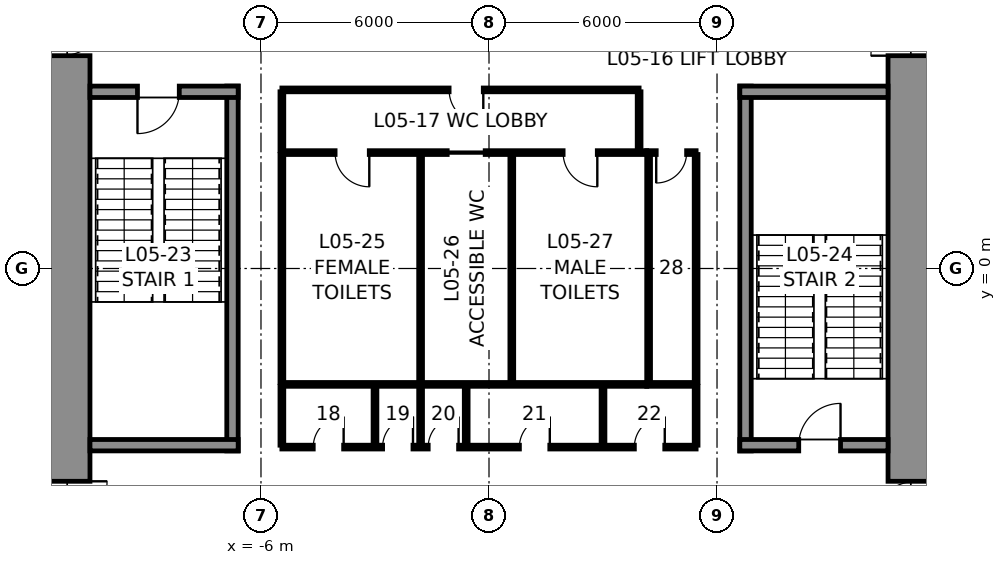
"""IFC4 building model, lengths in metres.
Left out: names, types, materials, properties, quantities, classifications, styles, units other than length and angle.
Written with IfcOpenShell. Run it as: python <this file> out.ifc"""

import sys

from ifc_helpers import new_model, si_unit, direction, frame, frame_2d, origin, place, context, subcontext, project, spatial, rectangle, extrude, element, fill, save


model = new_model("IFC4")
c1 = context("Model", 3, precision=1e-05, world=origin(), true_north=direction((0.0, 1.0)))
c2 = subcontext(c1, "Body", "Model", "MODEL_VIEW")
j1 = project(units=[si_unit("LENGTHUNIT", "METRE"), si_unit("PLANEANGLEUNIT", "RADIAN")], contexts=[c1])
p1 = place(None, origin())
s1 = spatial("IfcSite", under=j1, at=p1, CompositionType="ELEMENT")
p2 = place(p1, origin())
s2 = spatial("IfcBuilding", under=s1, at=p2, CompositionType="ELEMENT")
p3 = place(p2, frame((0.0, 0.0, 26.5)))
s3 = spatial("IfcBuildingStorey", under=s2, at=p3, CompositionType="ELEMENT", Elevation=26.5)
p4 = place(p3, frame((11.25, 10.5, 0.0), z_axis=(0.0, 0.0, 1.0), x_axis=(0.0, -1.0, 0.0)))
e1 = element("IfcWall", 1, at=p4, inside=s3, PredefinedType="SHEAR", context=c2, shape_type="SweptSolid", body=[
    extrude(rectangle(XDim=21.0, YDim=1.5, at=frame_2d((10.5, 0.0))), origin(), (0.0, 0.0, 1.0), 5.5),
])
p5 = place(p4, frame((3.7, 0.0, 0.0)))
e2 = element("IfcOpeningElement", 2, at=p5, cuts=e1, PredefinedType="OPENING", context=c2, shape_type="SweptSolid", body=[
    extrude(rectangle(XDim=1.2, YDim=2.3, at=frame_2d((0.6, 1.15))), frame((0.0, 0.76, 0.0), z_axis=(0.0, -1.0, 0.0), x_axis=(1.0, 0.0, 0.0)), (0.0, 0.0, 1.0), 1.52),
])
p6 = place(p4, frame((16.1, 0.0, 0.0)))
e3 = element("IfcOpeningElement", 3, at=p6, cuts=e1, PredefinedType="OPENING", context=c2, shape_type="SweptSolid", body=[
    extrude(rectangle(XDim=1.2, YDim=2.3, at=frame_2d((0.6, 1.15))), frame((0.0, 0.76, 0.0), z_axis=(0.0, -1.0, 0.0), x_axis=(1.0, 0.0, 0.0)), (0.0, 0.0, 1.0), 1.52),
])
p7 = place(p3, frame((-11.25, -10.5, 0.0), z_axis=(0.0, 0.0, 1.0), x_axis=(0.0, 1.0, 0.0)))
e4 = element("IfcWall", 4, at=p7, inside=s3, PredefinedType="SHEAR", context=c2, shape_type="SweptSolid", body=[
    extrude(rectangle(XDim=21.0, YDim=1.5, at=frame_2d((10.5, 0.0))), origin(), (0.0, 0.0, 1.0), 5.5),
])
p8 = place(p7, frame((16.1, 0.0, 0.0)))
e5 = element("IfcOpeningElement", 5, at=p8, cuts=e4, PredefinedType="OPENING", context=c2, shape_type="SweptSolid", body=[
    extrude(rectangle(XDim=1.2, YDim=2.3, at=frame_2d((0.6, 1.15))), frame((0.0, 0.76, 0.0), z_axis=(0.0, -1.0, 0.0), x_axis=(1.0, 0.0, 0.0)), (0.0, 0.0, 1.0), 1.52),
])
p9 = place(p7, frame((3.7, 0.0, 0.0)))
e6 = element("IfcOpeningElement", 6, at=p9, cuts=e4, PredefinedType="OPENING", context=c2, shape_type="SweptSolid", body=[
    extrude(rectangle(XDim=1.2, YDim=2.3, at=frame_2d((0.6, 1.15))), frame((0.0, 0.76, 0.0), z_axis=(0.0, -1.0, 0.0), x_axis=(1.0, 0.0, 0.0)), (0.0, 0.0, 1.0), 1.52),
])
p10 = place(p3, frame((-6.75, -4.8, 0.0), z_axis=(0.0, 0.0, 1.0), x_axis=(0.0, 1.0, 0.0)))
e7 = element("IfcWall", 7, at=p10, inside=s3, PredefinedType="SOLIDWALL", context=c2, shape_type="SweptSolid", body=[
    extrude(rectangle(XDim=9.6, YDim=0.3, at=frame_2d((4.8, 0.0))), origin(), (0.0, 0.0, 1.0), 5.25),
])
p11 = place(p3, frame((-10.5, 4.65, 0.0), z_axis=(0.0, 0.0, 1.0), x_axis=(1.0, 0.0, 0.0)))
e8 = element("IfcWall", 8, at=p11, inside=s3, PredefinedType="SOLIDWALL", context=c2, shape_type="SweptSolid", body=[
    extrude(rectangle(XDim=3.9, YDim=0.3, at=frame_2d((1.95, 0.0))), origin(), (0.0, 0.0, 1.0), 5.25),
])
p12 = place(p11, frame((1.25, 0.0, 0.0)))
e9 = element("IfcOpeningElement", 9, at=p12, cuts=e8, PredefinedType="OPENING", context=c2, shape_type="SweptSolid", body=[
    extrude(rectangle(XDim=1.1, YDim=2.3, at=frame_2d((0.55, 1.15))), frame((0.0, 0.16, 0.0), z_axis=(0.0, -1.0, 0.0), x_axis=(1.0, 0.0, 0.0)), (0.0, 0.0, 1.0), 0.32),
])
p13 = place(p3, frame((-6.6, -4.65, 0.0), z_axis=(0.0, 0.0, 1.0), x_axis=(-1.0, 0.0, 0.0)))
e10 = element("IfcWall", 10, at=p13, inside=s3, PredefinedType="SOLIDWALL", context=c2, shape_type="SweptSolid", body=[
    extrude(rectangle(XDim=3.9, YDim=0.3, at=frame_2d((1.95, 0.0))), origin(), (0.0, 0.0, 1.0), 5.25),
])
p14 = place(p3, frame((6.75, -4.8, 0.0), z_axis=(0.0, 0.0, 1.0), x_axis=(0.0, 1.0, 0.0)))
e11 = element("IfcWall", 11, at=p14, inside=s3, PredefinedType="SOLIDWALL", context=c2, shape_type="SweptSolid", body=[
    extrude(rectangle(XDim=9.6, YDim=0.3, at=frame_2d((4.8, 0.0))), origin(), (0.0, 0.0, 1.0), 5.25),
])
p15 = place(p3, frame((6.6, 4.65, 0.0), z_axis=(0.0, 0.0, 1.0), x_axis=(1.0, 0.0, 0.0)))
e12 = element("IfcWall", 12, at=p15, inside=s3, PredefinedType="SOLIDWALL", context=c2, shape_type="SweptSolid", body=[
    extrude(rectangle(XDim=3.9, YDim=0.3, at=frame_2d((1.95, 0.0))), origin(), (0.0, 0.0, 1.0), 5.25),
])
p16 = place(p3, frame((10.5, -4.65, 0.0), z_axis=(0.0, 0.0, 1.0), x_axis=(-1.0, 0.0, 0.0)))
e13 = element("IfcWall", 13, at=p16, inside=s3, PredefinedType="SOLIDWALL", context=c2, shape_type="SweptSolid", body=[
    extrude(rectangle(XDim=3.9, YDim=0.3, at=frame_2d((1.95, 0.0))), origin(), (0.0, 0.0, 1.0), 5.25),
])
p17 = place(p16, frame((1.25, 0.0, 0.0)))
e14 = element("IfcOpeningElement", 14, at=p17, cuts=e13, PredefinedType="OPENING", context=c2, shape_type="SweptSolid", body=[
    extrude(rectangle(XDim=1.1, YDim=2.3, at=frame_2d((0.55, 1.15))), frame((0.0, 0.16, 0.0), z_axis=(0.0, -1.0, 0.0), x_axis=(1.0, 0.0, 0.0)), (0.0, 0.0, 1.0), 0.32),
])
p18 = place(p3, frame((-5.45, 3.05, 0.0), z_axis=(0.0, 0.0, 1.0), x_axis=(1.0, 0.0, 0.0)))
e15 = element("IfcWall", 15, at=p18, inside=s3, PredefinedType="PARTITIONING", context=c2, shape_type="SweptSolid", body=[
    extrude(rectangle(XDim=9.6, YDim=0.1, at=frame_2d((4.8, 0.0))), origin(), (0.0, 0.0, 1.0), 5.25),
])
p19 = place(p18, frame((1.4, 0.0, 0.0)))
e16 = element("IfcOpeningElement", 16, at=p19, cuts=e15, PredefinedType="OPENING", context=c2, shape_type="SweptSolid", body=[
    extrude(rectangle(XDim=0.9, YDim=2.3, at=frame_2d((0.45, 1.15))), frame((0.0, 0.06, 0.0), z_axis=(0.0, -1.0, 0.0), x_axis=(1.0, 0.0, 0.0)), (0.0, 0.0, 1.0), 0.12),
])
p20 = place(p18, frame((4.35, 0.0, 0.0)))
e17 = element("IfcOpeningElement", 17, at=p20, cuts=e15, PredefinedType="OPENING", context=c2, shape_type="SweptSolid", body=[
    extrude(rectangle(XDim=1.0, YDim=2.3, at=frame_2d((0.5, 1.15))), frame((0.0, 0.06, 0.0), z_axis=(0.0, -1.0, 0.0), x_axis=(1.0, 0.0, 0.0)), (0.0, 0.0, 1.0), 0.12),
])
p21 = place(p18, frame((7.4, 0.0, 0.0)))
e18 = element("IfcOpeningElement", 18, at=p21, cuts=e15, PredefinedType="OPENING", context=c2, shape_type="SweptSolid", body=[
    extrude(rectangle(XDim=0.9, YDim=2.3, at=frame_2d((0.45, 1.15))), frame((0.0, 0.06, 0.0), z_axis=(0.0, -1.0, 0.0), x_axis=(1.0, 0.0, 0.0)), (0.0, 0.0, 1.0), 0.12),
])
p22 = place(p3, frame((4.15, 3.05, 0.0), z_axis=(0.0, 0.0, 1.0), x_axis=(1.0, 0.0, 0.0)))
e19 = element("IfcWall", 19, at=p22, inside=s3, PredefinedType="PARTITIONING", context=c2, shape_type="SweptSolid", body=[
    extrude(rectangle(XDim=1.3, YDim=0.1, at=frame_2d((0.65, 0.0))), origin(), (0.0, 0.0, 1.0), 5.25),
])
p23 = place(p22, frame((0.25, 0.0, 0.0)))
e20 = element("IfcOpeningElement", 20, at=p23, cuts=e19, PredefinedType="OPENING", context=c2, shape_type="SweptSolid", body=[
    extrude(rectangle(XDim=0.8, YDim=2.3, at=frame_2d((0.4, 1.15))), frame((0.0, 0.06, 0.0), z_axis=(0.0, -1.0, 0.0), x_axis=(1.0, 0.0, 0.0)), (0.0, 0.0, 1.0), 0.12),
])
p24 = place(p3, frame((4.15, -3.05, 0.0), z_axis=(0.0, 0.0, 1.0), x_axis=(-1.0, 0.0, 0.0)))
e21 = element("IfcWall", 21, at=p24, inside=s3, PredefinedType="PARTITIONING", context=c2, shape_type="SweptSolid", body=[
    extrude(rectangle(XDim=9.6, YDim=0.1, at=frame_2d((4.8, 0.0))), origin(), (0.0, 0.0, 1.0), 5.25),
])
p25 = place(p3, frame((5.45, -3.05, 0.0), z_axis=(0.0, 0.0, 1.0), x_axis=(-1.0, 0.0, 0.0)))
e22 = element("IfcWall", 22, at=p25, inside=s3, PredefinedType="PARTITIONING", context=c2, shape_type="SweptSolid", body=[
    extrude(rectangle(XDim=1.3, YDim=0.1, at=frame_2d((0.65, 0.0))), origin(), (0.0, 0.0, 1.0), 5.25),
])
for number, where, z_axis, x_axis in (
    (23, (5.45, 3.0, 0.0), (0.0, 0.0, 1.0), (0.0, -1.0, 0.0)),
    (24, (-5.45, -3.0, 0.0), (0.0, 0.0, 1.0), (0.0, 1.0, 0.0)),
    (25, (-1.8, -3.0, 0.0), (0.0, 0.0, 1.0), (0.0, 1.0, 0.0)),
    (26, (0.6, -3.0, 0.0), (0.0, 0.0, 1.0), (0.0, 1.0, 0.0)),
    (27, (4.2, -3.0, 0.0), (0.0, 0.0, 1.0), (0.0, 1.0, 0.0)),
):
    element("IfcWall", number, at=place(p3, frame(where, z_axis=z_axis, x_axis=x_axis)), inside=s3, PredefinedType="PARTITIONING", context=c2, shape_type="SweptSolid", body=[
        extrude(rectangle(XDim=6.0, YDim=0.1, at=frame_2d((3.0, 0.0))), origin(), (0.0, 0.0, 1.0), 5.25),
    ])
p26 = place(p3, frame((-5.45, 4.7, 0.0), z_axis=(0.0, 0.0, 1.0), x_axis=(1.0, 0.0, 0.0)))
e28 = element("IfcWall", 28, at=p26, inside=s3, PredefinedType="PARTITIONING", context=c2, shape_type="SweptSolid", body=[
    extrude(rectangle(XDim=9.4, YDim=0.1, at=frame_2d((4.7, 0.0))), origin(), (0.0, 0.0, 1.0), 5.25),
])
p27 = place(p26, frame((4.4, 0.0, 0.0)))
e29 = element("IfcOpeningElement", 29, at=p27, cuts=e28, PredefinedType="OPENING", context=c2, shape_type="SweptSolid", body=[
    extrude(rectangle(XDim=0.9, YDim=2.3, at=frame_2d((0.45, 1.15))), frame((0.0, 0.06, 0.0), z_axis=(0.0, -1.0, 0.0), x_axis=(1.0, 0.0, 0.0)), (0.0, 0.0, 1.0), 0.12),
])
for number, where, z_axis, x_axis in (
    (30, (-5.45, 3.1, 0.0), (0.0, 0.0, 1.0), (0.0, 1.0, 0.0)),
    (31, (3.95, 3.1, 0.0), (0.0, 0.0, 1.0), (0.0, 1.0, 0.0)),
):
    element("IfcWall", number, at=place(p3, frame(where, z_axis=z_axis, x_axis=x_axis)), inside=s3, PredefinedType="PARTITIONING", context=c2, shape_type="SweptSolid", body=[
        extrude(rectangle(XDim=1.55, YDim=0.1, at=frame_2d((0.775, 0.0))), origin(), (0.0, 0.0, 1.0), 5.25),
    ])
p28 = place(p3, frame((5.45, -4.7, 0.0), z_axis=(0.0, 0.0, 1.0), x_axis=(-1.0, 0.0, 0.0)))
e32 = element("IfcWall", 32, at=p28, inside=s3, PredefinedType="PARTITIONING", context=c2, shape_type="SweptSolid", body=[
    extrude(rectangle(XDim=10.9, YDim=0.1, at=frame_2d((5.45, 0.0))), origin(), (0.0, 0.0, 1.0), 5.25),
])
p29 = place(p28, frame((9.275, 0.0, 0.0)))
e33 = element("IfcOpeningElement", 33, at=p29, cuts=e32, PredefinedType="OPENING", context=c2, shape_type="SweptSolid", body=[
    extrude(rectangle(XDim=0.8, YDim=2.3, at=frame_2d((0.4, 1.15))), frame((0.0, 0.06, 0.0), z_axis=(0.0, -1.0, 0.0), x_axis=(1.0, 0.0, 0.0)), (0.0, 0.0, 1.0), 0.12),
])
p30 = place(p28, frame((7.45, 0.0, 0.0)))
e34 = element("IfcOpeningElement", 34, at=p30, cuts=e32, PredefinedType="OPENING", context=c2, shape_type="SweptSolid", body=[
    extrude(rectangle(XDim=0.8, YDim=2.3, at=frame_2d((0.4, 1.15))), frame((0.0, 0.06, 0.0), z_axis=(0.0, -1.0, 0.0), x_axis=(1.0, 0.0, 0.0)), (0.0, 0.0, 1.0), 0.12),
])
p31 = place(p28, frame((6.25, 0.0, 0.0)))
e35 = element("IfcOpeningElement", 35, at=p31, cuts=e32, PredefinedType="OPENING", context=c2, shape_type="SweptSolid", body=[
    extrude(rectangle(XDim=0.8, YDim=2.3, at=frame_2d((0.4, 1.15))), frame((0.0, 0.06, 0.0), z_axis=(0.0, -1.0, 0.0), x_axis=(1.0, 0.0, 0.0)), (0.0, 0.0, 1.0), 0.12),
])
p32 = place(p28, frame((3.85, 0.0, 0.0)))
e36 = element("IfcOpeningElement", 36, at=p32, cuts=e32, PredefinedType="OPENING", context=c2, shape_type="SweptSolid", body=[
    extrude(rectangle(XDim=0.8, YDim=2.3, at=frame_2d((0.4, 1.15))), frame((0.0, 0.06, 0.0), z_axis=(0.0, -1.0, 0.0), x_axis=(1.0, 0.0, 0.0)), (0.0, 0.0, 1.0), 0.12),
])
p33 = place(p28, frame((0.825, 0.0, 0.0)))
e37 = element("IfcOpeningElement", 37, at=p33, cuts=e32, PredefinedType="OPENING", context=c2, shape_type="SweptSolid", body=[
    extrude(rectangle(XDim=0.8, YDim=2.3, at=frame_2d((0.4, 1.15))), frame((0.0, 0.06, 0.0), z_axis=(0.0, -1.0, 0.0), x_axis=(1.0, 0.0, 0.0)), (0.0, 0.0, 1.0), 0.12),
])
for number, where, z_axis, x_axis in (
    (38, (-5.45, -3.1, 0.0), (0.0, 0.0, 1.0), (0.0, -1.0, 0.0)),
    (39, (5.45, -3.1, 0.0), (0.0, 0.0, 1.0), (0.0, -1.0, 0.0)),
    (40, (-3.0, -3.1, 0.0), (0.0, 0.0, 1.0), (0.0, -1.0, 0.0)),
    (41, (-1.8, -3.1, 0.0), (0.0, 0.0, 1.0), (0.0, -1.0, 0.0)),
    (42, (-0.6, -3.1, 0.0), (0.0, 0.0, 1.0), (0.0, -1.0, 0.0)),
    (43, (3.0, -3.1, 0.0), (0.0, 0.0, 1.0), (0.0, -1.0, 0.0)),
):
    element("IfcWall", number, at=place(p3, frame(where, z_axis=z_axis, x_axis=x_axis)), inside=s3, PredefinedType="PARTITIONING", context=c2, shape_type="SweptSolid", body=[
        extrude(rectangle(XDim=1.55, YDim=0.1, at=frame_2d((0.775, 0.0))), origin(), (0.0, 0.0, 1.0), 5.25),
    ])
p34 = place(p12, frame((1.1, 0.0, 0.0), z_axis=(0.0, 0.0, 1.0), x_axis=(-1.0, 0.0, 0.0)))
e44 = element("IfcDoor", 44, at=p34, inside=s3, OperationType="SINGLE_SWING_RIGHT", PredefinedType="DOOR", context=c2, shape_type="SweptSolid", body=[
    extrude(rectangle(XDim=1.1, YDim=2.3, at=frame_2d((0.55, 1.15))), frame((0.0, 0.025, 0.0), z_axis=(0.0, -1.0, 0.0), x_axis=(1.0, 0.0, 0.0)), (0.0, 0.0, 1.0), 0.05),
])
fill(e9, e44)
p35 = place(p17, frame((1.1, 0.0, 0.0), z_axis=(0.0, 0.0, 1.0), x_axis=(-1.0, 0.0, 0.0)))
e45 = element("IfcDoor", 45, at=p35, inside=s3, OperationType="SINGLE_SWING_RIGHT", PredefinedType="DOOR", context=c2, shape_type="SweptSolid", body=[
    extrude(rectangle(XDim=1.1, YDim=2.3, at=frame_2d((0.55, 1.15))), frame((0.0, 0.025, 0.0), z_axis=(0.0, -1.0, 0.0), x_axis=(1.0, 0.0, 0.0)), (0.0, 0.0, 1.0), 0.05),
])
fill(e14, e45)
p36 = place(p19, frame((0.9, 0.0, 0.0), z_axis=(0.0, 0.0, 1.0), x_axis=(-1.0, 0.0, 0.0)))
e46 = element("IfcDoor", 46, at=p36, inside=s3, OperationType="SINGLE_SWING_LEFT", PredefinedType="DOOR", context=c2, shape_type="SweptSolid", body=[
    extrude(rectangle(XDim=0.9, YDim=2.3, at=frame_2d((0.45, 1.15))), frame((0.0, 0.025, 0.0), z_axis=(0.0, -1.0, 0.0), x_axis=(1.0, 0.0, 0.0)), (0.0, 0.0, 1.0), 0.05),
])
fill(e16, e46)
p37 = place(p20, frame((1.0, 0.0, 0.0), z_axis=(0.0, 0.0, 1.0), x_axis=(-1.0, 0.0, 0.0)))
e47 = element("IfcDoor", 47, at=p37, inside=s3, OperationType="SLIDING_TO_LEFT", PredefinedType="DOOR", context=c2, shape_type="SweptSolid", body=[
    extrude(rectangle(XDim=1.0, YDim=2.3, at=frame_2d((0.5, 1.15))), frame((0.0, 0.025, 0.0), z_axis=(0.0, -1.0, 0.0), x_axis=(1.0, 0.0, 0.0)), (0.0, 0.0, 1.0), 0.05),
])
fill(e17, e47)
p38 = place(p21, frame((0.9, 0.0, 0.0), z_axis=(0.0, 0.0, 1.0), x_axis=(-1.0, 0.0, 0.0)))
e48 = element("IfcDoor", 48, at=p38, inside=s3, OperationType="SINGLE_SWING_LEFT", PredefinedType="DOOR", context=c2, shape_type="SweptSolid", body=[
    extrude(rectangle(XDim=0.9, YDim=2.3, at=frame_2d((0.45, 1.15))), frame((0.0, 0.025, 0.0), z_axis=(0.0, -1.0, 0.0), x_axis=(1.0, 0.0, 0.0)), (0.0, 0.0, 1.0), 0.05),
])
fill(e18, e48)
p39 = place(p23, frame((0.8, 0.0, 0.0), z_axis=(0.0, 0.0, 1.0), x_axis=(-1.0, 0.0, 0.0)))
e49 = element("IfcDoor", 49, at=p39, inside=s3, OperationType="SINGLE_SWING_RIGHT", PredefinedType="DOOR", context=c2, shape_type="SweptSolid", body=[
    extrude(rectangle(XDim=0.8, YDim=2.3, at=frame_2d((0.4, 1.15))), frame((0.0, 0.025, 0.0), z_axis=(0.0, -1.0, 0.0), x_axis=(1.0, 0.0, 0.0)), (0.0, 0.0, 1.0), 0.05),
])
fill(e20, e49)
p40 = place(p27, frame((0.9, 0.0, 0.0), z_axis=(0.0, 0.0, 1.0), x_axis=(-1.0, 0.0, 0.0)))
e50 = element("IfcDoor", 50, at=p40, inside=s3, OperationType="SINGLE_SWING_LEFT", PredefinedType="DOOR", context=c2, shape_type="SweptSolid", body=[
    extrude(rectangle(XDim=0.9, YDim=2.3, at=frame_2d((0.45, 1.15))), frame((0.0, 0.025, 0.0), z_axis=(0.0, -1.0, 0.0), x_axis=(1.0, 0.0, 0.0)), (0.0, 0.0, 1.0), 0.05),
])
fill(e29, e50)
p41 = place(p29, frame((0.8, 0.0, 0.0), z_axis=(0.0, 0.0, 1.0), x_axis=(-1.0, 0.0, 0.0)))
e51 = element("IfcDoor", 51, at=p41, inside=s3, OperationType="SINGLE_SWING_RIGHT", PredefinedType="DOOR", context=c2, shape_type="SweptSolid", body=[
    extrude(rectangle(XDim=0.8, YDim=2.3, at=frame_2d((0.4, 1.15))), frame((0.0, 0.025, 0.0), z_axis=(0.0, -1.0, 0.0), x_axis=(1.0, 0.0, 0.0)), (0.0, 0.0, 1.0), 0.05),
])
fill(e33, e51)
p42 = place(p30, frame((0.8, 0.0, 0.0), z_axis=(0.0, 0.0, 1.0), x_axis=(-1.0, 0.0, 0.0)))
e52 = element("IfcDoor", 52, at=p42, inside=s3, OperationType="SINGLE_SWING_RIGHT", PredefinedType="DOOR", context=c2, shape_type="SweptSolid", body=[
    extrude(rectangle(XDim=0.8, YDim=2.3, at=frame_2d((0.4, 1.15))), frame((0.0, 0.025, 0.0), z_axis=(0.0, -1.0, 0.0), x_axis=(1.0, 0.0, 0.0)), (0.0, 0.0, 1.0), 0.05),
])
fill(e34, e52)
p43 = place(p31, frame((0.8, 0.0, 0.0), z_axis=(0.0, 0.0, 1.0), x_axis=(-1.0, 0.0, 0.0)))
e53 = element("IfcDoor", 53, at=p43, inside=s3, OperationType="SINGLE_SWING_RIGHT", PredefinedType="DOOR", context=c2, shape_type="SweptSolid", body=[
    extrude(rectangle(XDim=0.8, YDim=2.3, at=frame_2d((0.4, 1.15))), frame((0.0, 0.025, 0.0), z_axis=(0.0, -1.0, 0.0), x_axis=(1.0, 0.0, 0.0)), (0.0, 0.0, 1.0), 0.05),
])
fill(e35, e53)
p44 = place(p32, frame((0.8, 0.0, 0.0), z_axis=(0.0, 0.0, 1.0), x_axis=(-1.0, 0.0, 0.0)))
e54 = element("IfcDoor", 54, at=p44, inside=s3, OperationType="SINGLE_SWING_RIGHT", PredefinedType="DOOR", context=c2, shape_type="SweptSolid", body=[
    extrude(rectangle(XDim=0.8, YDim=2.3, at=frame_2d((0.4, 1.15))), frame((0.0, 0.025, 0.0), z_axis=(0.0, -1.0, 0.0), x_axis=(1.0, 0.0, 0.0)), (0.0, 0.0, 1.0), 0.05),
])
fill(e36, e54)
p45 = place(p33, frame((0.8, 0.0, 0.0), z_axis=(0.0, 0.0, 1.0), x_axis=(-1.0, 0.0, 0.0)))
e55 = element("IfcDoor", 55, at=p45, inside=s3, OperationType="SINGLE_SWING_RIGHT", PredefinedType="DOOR", context=c2, shape_type="SweptSolid", body=[
    extrude(rectangle(XDim=0.8, YDim=2.3, at=frame_2d((0.4, 1.15))), frame((0.0, 0.025, 0.0), z_axis=(0.0, -1.0, 0.0), x_axis=(1.0, 0.0, 0.0)), (0.0, 0.0, 1.0), 0.05),
])
fill(e37, e55)
p46 = place(p8, frame((1.2, 0.0, 0.0), z_axis=(0.0, 0.0, 1.0), x_axis=(-1.0, 0.0, 0.0)))
e56 = element("IfcDoor", 56, at=p46, inside=s3, OperationType="SINGLE_SWING_LEFT", PredefinedType="DOOR", context=c2, shape_type="SweptSolid", body=[
    extrude(rectangle(XDim=1.2, YDim=2.3, at=frame_2d((0.6, 1.15))), frame((0.0, 0.025, 0.0), z_axis=(0.0, -1.0, 0.0), x_axis=(1.0, 0.0, 0.0)), (0.0, 0.0, 1.0), 0.05),
])
fill(e5, e56)
p47 = place(p9, frame((1.2, 0.0, 0.0), z_axis=(0.0, 0.0, 1.0), x_axis=(-1.0, 0.0, 0.0)))
e57 = element("IfcDoor", 57, at=p47, inside=s3, OperationType="SINGLE_SWING_LEFT", PredefinedType="DOOR", context=c2, shape_type="SweptSolid", body=[
    extrude(rectangle(XDim=1.2, YDim=2.3, at=frame_2d((0.6, 1.15))), frame((0.0, 0.025, 0.0), z_axis=(0.0, -1.0, 0.0), x_axis=(1.0, 0.0, 0.0)), (0.0, 0.0, 1.0), 0.05),
])
fill(e6, e57)
p48 = place(p5, frame((1.2, 0.0, 0.0), z_axis=(0.0, 0.0, 1.0), x_axis=(-1.0, 0.0, 0.0)))
e58 = element("IfcDoor", 58, at=p48, inside=s3, OperationType="SINGLE_SWING_LEFT", PredefinedType="DOOR", context=c2, shape_type="SweptSolid", body=[
    extrude(rectangle(XDim=1.2, YDim=2.3, at=frame_2d((0.6, 1.15))), frame((0.0, 0.025, 0.0), z_axis=(0.0, -1.0, 0.0), x_axis=(1.0, 0.0, 0.0)), (0.0, 0.0, 1.0), 0.05),
])
fill(e2, e58)
p49 = place(p6, frame((1.2, 0.0, 0.0), z_axis=(0.0, 0.0, 1.0), x_axis=(-1.0, 0.0, 0.0)))
e59 = element("IfcDoor", 59, at=p49, inside=s3, OperationType="SINGLE_SWING_LEFT", PredefinedType="DOOR", context=c2, shape_type="SweptSolid", body=[
    extrude(rectangle(XDim=1.2, YDim=2.3, at=frame_2d((0.6, 1.15))), frame((0.0, 0.025, 0.0), z_axis=(0.0, -1.0, 0.0), x_axis=(1.0, 0.0, 0.0)), (0.0, 0.0, 1.0), 0.05),
])
fill(e3, e59)
save(model, sys.argv[1])
